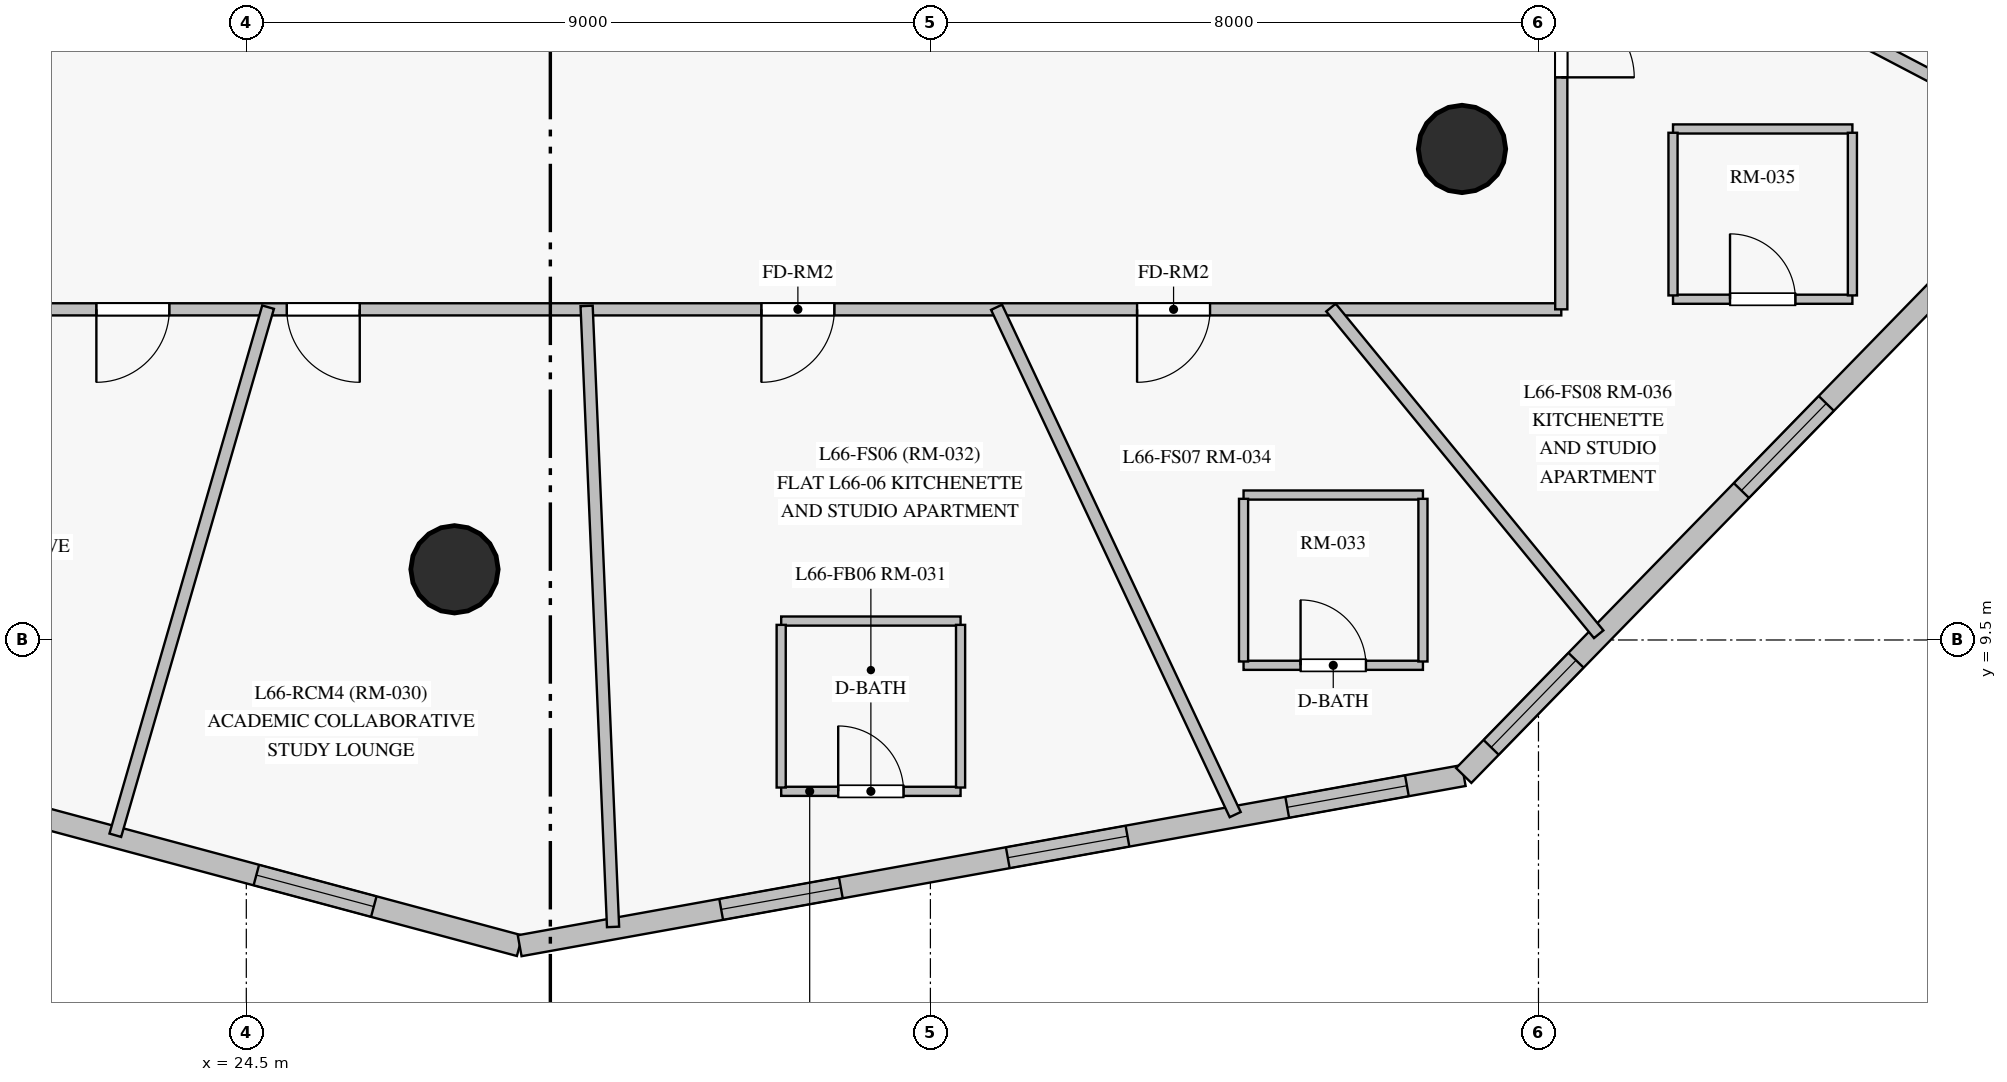
"""IFC4 building model, lengths in metres.
Left out: names, types, materials, properties, quantities, classifications, styles, units other than length and angle.
Written with IfcOpenShell. Run it as: python <this file> out.ifc"""

import sys

from ifc_helpers import new_model, si_unit, direction, frame, frame_2d, origin, origin_with_axes, origin_2d, place, context, subcontext, project, spatial, rectangle, circle, extrude, source, transform, mapped, element, fill, save


model = new_model("IFC4")
c1 = context("Model", 3, precision=1e-05, world=origin(), true_north=direction((0.0, 1.0)))
c2 = subcontext(c1, "Body", "Model", "MODEL_VIEW")
j1 = project(units=[si_unit("LENGTHUNIT", "METRE"), si_unit("PLANEANGLEUNIT", "RADIAN")], contexts=[c1])
p1 = place(None, origin())
s1 = spatial("IfcSite", under=j1, at=p1, CompositionType="ELEMENT")
p2 = place(p1, origin())
s2 = spatial("IfcBuilding", under=s1, at=p2, CompositionType="ELEMENT")
p3 = place(p2, frame((0.0, 0.0, 226.05)))
s3 = spatial("IfcBuildingStorey", under=s2, at=p3, CompositionType="ELEMENT", Elevation=226.05)
m1 = source(origin_with_axes(), c2, "Body", "SweptSolid", [
    extrude(circle(Radius=0.575, at=origin_2d()), origin(), (0.0, 0.0, 1.0), 3.05),
])
for number, where, z_axis, x_axis in (
    (1, (27.239, 10.43, 0.0), (0.0, 0.0, 1.0), (1.0, 0.0, 0.0)),
    (2, (40.494, 15.96, 0.0), (0.0, 0.0, 1.0), (1.0, 0.0, 0.0)),
):
    element("IfcColumn", number, at=place(p3, frame(where, z_axis=z_axis, x_axis=x_axis)), inside=s3, PredefinedType="COLUMN", context=c2, shape_type="MappedRepresentation", body=[
        mapped(m1, transform((0.0, 0.0, 0.0), scale=1.0)),
    ])
p4 = place(p3, frame((18.847, 7.96, 0.0), z_axis=(0.0, 0.0, 1.0), x_axis=(0.965828362132, -0.259182512722, 0.0)))
e3 = element("IfcWall", 3, at=p4, inside=s3, PredefinedType="SOLIDWALL", context=c2, shape_type="SweptSolid", body=[
    extrude(rectangle(XDim=9.576, YDim=0.28, at=frame_2d((4.788, 0.0))), origin(), (0.0, 0.0, 1.0), 2.85),
])
p5 = place(p4, frame((1.261, 0.0, 0.85)))
e4 = element("IfcOpeningElement", 4, at=p5, cuts=e3, PredefinedType="OPENING", context=c2, shape_type="SweptSolid", body=[
    extrude(rectangle(XDim=1.6, YDim=1.6, at=frame_2d((0.8, 0.8))), frame((0.0, 0.15, 0.0), z_axis=(0.0, -1.0, 0.0), x_axis=(1.0, 0.0, 0.0)), (0.0, 0.0, 1.0), 0.3),
])
p6 = place(p4, frame((5.989, 0.0, 0.85)))
e5 = element("IfcOpeningElement", 5, at=p6, cuts=e3, PredefinedType="OPENING", context=c2, shape_type="SweptSolid", body=[
    extrude(rectangle(XDim=1.6, YDim=1.6, at=frame_2d((0.8, 0.8))), frame((0.0, 0.15, 0.0), z_axis=(0.0, -1.0, 0.0), x_axis=(1.0, 0.0, 0.0)), (0.0, 0.0, 1.0), 0.3),
])
p7 = place(p3, frame((28.096, 5.478, 0.0), z_axis=(0.0, 0.0, 1.0), x_axis=(0.984130395751, 0.177446792472, 0.0)))
e6 = element("IfcWall", 6, at=p7, inside=s3, PredefinedType="SOLIDWALL", context=c2, shape_type="SweptSolid", body=[
    extrude(rectangle(XDim=12.621, YDim=0.28, at=frame_2d((6.31, 0.0))), origin(), (0.0, 0.0, 1.0), 2.85),
])
p8 = place(p7, frame((2.694, 0.0, 0.85)))
e7 = element("IfcOpeningElement", 7, at=p8, cuts=e6, PredefinedType="OPENING", context=c2, shape_type="SweptSolid", body=[
    extrude(rectangle(XDim=1.6, YDim=1.6, at=frame_2d((0.8, 0.8))), frame((0.0, 0.15, 0.0), z_axis=(0.0, -1.0, 0.0), x_axis=(1.0, 0.0, 0.0)), (0.0, 0.0, 1.0), 0.3),
])
p9 = place(p7, frame((6.525, 0.0, 0.85)))
e8 = element("IfcOpeningElement", 8, at=p9, cuts=e6, PredefinedType="OPENING", context=c2, shape_type="SweptSolid", body=[
    extrude(rectangle(XDim=1.6, YDim=1.6, at=frame_2d((0.8, 0.8))), frame((0.0, 0.15, 0.0), z_axis=(0.0, -1.0, 0.0), x_axis=(1.0, 0.0, 0.0)), (0.0, 0.0, 1.0), 0.3),
])
p10 = place(p7, frame((10.261, 0.0, 0.85)))
e9 = element("IfcOpeningElement", 9, at=p10, cuts=e6, PredefinedType="OPENING", context=c2, shape_type="SweptSolid", body=[
    extrude(rectangle(XDim=1.6, YDim=1.6, at=frame_2d((0.8, 0.8))), frame((0.0, 0.15, 0.0), z_axis=(0.0, -1.0, 0.0), x_axis=(1.0, 0.0, 0.0)), (0.0, 0.0, 1.0), 0.3),
])
p11 = place(p3, frame((40.517, 7.717, 0.0), z_axis=(0.0, 0.0, 1.0), x_axis=(0.69791379091, 0.716181778921, 0.0)))
e10 = element("IfcWall", 10, at=p11, inside=s3, PredefinedType="SOLIDWALL", context=c2, shape_type="SweptSolid", body=[
    extrude(rectangle(XDim=9.556, YDim=0.28, at=frame_2d((4.778, 0.0))), origin(), (0.0, 0.0, 1.0), 2.85),
])
p12 = place(p11, frame((0.517, 0.0, 0.85)))
e11 = element("IfcOpeningElement", 11, at=p12, cuts=e10, PredefinedType="OPENING", context=c2, shape_type="SweptSolid", body=[
    extrude(rectangle(XDim=1.6, YDim=1.6, at=frame_2d((0.8, 0.8))), frame((0.0, 0.15, 0.0), z_axis=(0.0, -1.0, 0.0), x_axis=(1.0, 0.0, 0.0)), (0.0, 0.0, 1.0), 0.3),
])
p13 = place(p11, frame((5.235, 0.0, 0.85)))
e12 = element("IfcOpeningElement", 12, at=p13, cuts=e10, PredefinedType="OPENING", context=c2, shape_type="SweptSolid", body=[
    extrude(rectangle(XDim=1.6, YDim=1.6, at=frame_2d((0.8, 0.8))), frame((0.0, 0.15, 0.0), z_axis=(0.0, -1.0, 0.0), x_axis=(1.0, 0.0, 0.0)), (0.0, 0.0, 1.0), 0.3),
])
p14 = place(p3, frame((41.8, 13.85, 0.0), z_axis=(0.0, 0.0, 1.0), x_axis=(-1.0, 0.0, 0.0)))
e13 = element("IfcWall", 13, at=p14, inside=s3, PredefinedType="PARTITIONING", context=c2, shape_type="SweptSolid", body=[
    extrude(rectangle(XDim=25.05, YDim=0.16, at=frame_2d((12.525, 0.0))), origin(), (0.0, 0.0, 1.0), 2.3),
])
p15 = place(p14, frame((9.563, 0.0, 0.0)))
e14 = element("IfcOpeningElement", 14, at=p15, cuts=e13, PredefinedType="OPENING", context=c2, shape_type="SweptSolid", body=[
    extrude(rectangle(XDim=0.96, YDim=2.15, at=frame_2d((0.48, 1.075))), frame((0.0, 0.09, 0.0), z_axis=(0.0, -1.0, 0.0), x_axis=(1.0, 0.0, 0.0)), (0.0, 0.0, 1.0), 0.18),
])
p16 = place(p14, frame((4.621, 0.0, 0.0)))
e15 = element("IfcOpeningElement", 15, at=p16, cuts=e13, PredefinedType="OPENING", context=c2, shape_type="SweptSolid", body=[
    extrude(rectangle(XDim=0.96, YDim=2.15, at=frame_2d((0.48, 1.075))), frame((0.0, 0.09, 0.0), z_axis=(0.0, -1.0, 0.0), x_axis=(1.0, 0.0, 0.0)), (0.0, 0.0, 1.0), 0.18),
])
p17 = place(p14, frame((18.312, 0.0, 0.0)))
e16 = element("IfcOpeningElement", 16, at=p17, cuts=e13, PredefinedType="OPENING", context=c2, shape_type="SweptSolid", body=[
    extrude(rectangle(XDim=0.96, YDim=2.15, at=frame_2d((0.48, 1.075))), frame((0.0, 0.09, 0.0), z_axis=(0.0, -1.0, 0.0), x_axis=(1.0, 0.0, 0.0)), (0.0, 0.0, 1.0), 0.18),
])
p18 = place(p14, frame((15.808, 0.0, 0.0)))
e17 = element("IfcOpeningElement", 17, at=p18, cuts=e13, PredefinedType="OPENING", context=c2, shape_type="SweptSolid", body=[
    extrude(rectangle(XDim=0.96, YDim=2.15, at=frame_2d((0.48, 1.075))), frame((0.0, 0.09, 0.0), z_axis=(0.0, -1.0, 0.0), x_axis=(1.0, 0.0, 0.0)), (0.0, 0.0, 1.0), 0.18),
])
p19 = place(p3, frame((41.8, 33.45, 0.0), z_axis=(0.0, 0.0, 1.0), x_axis=(0.0, -1.0, 0.0)))
e18 = element("IfcWall", 18, at=p19, inside=s3, PredefinedType="PARTITIONING", context=c2, shape_type="SweptSolid", body=[
    extrude(rectangle(XDim=19.6, YDim=0.16, at=frame_2d((9.8, 0.0))), origin(), (0.0, 0.0, 1.0), 2.3),
])
p20 = place(p19, frame((15.588, 0.0, 0.0)))
e19 = element("IfcOpeningElement", 19, at=p20, cuts=e18, PredefinedType="OPENING", context=c2, shape_type="SweptSolid", body=[
    extrude(rectangle(XDim=0.96, YDim=2.15, at=frame_2d((0.48, 1.075))), frame((0.0, 0.09, 0.0), z_axis=(0.0, -1.0, 0.0), x_axis=(1.0, 0.0, 0.0)), (0.0, 0.0, 1.0), 0.18),
])
p21 = place(p19, frame((9.365, 0.0, 0.0)))
e20 = element("IfcOpeningElement", 20, at=p21, cuts=e18, PredefinedType="OPENING", context=c2, shape_type="SweptSolid", body=[
    extrude(rectangle(XDim=0.96, YDim=2.15, at=frame_2d((0.48, 1.075))), frame((0.0, 0.09, 0.0), z_axis=(0.0, -1.0, 0.0), x_axis=(1.0, 0.0, 0.0)), (0.0, 0.0, 1.0), 0.18),
])
p22 = place(p19, frame((6.385, 0.0, 0.0)))
e21 = element("IfcOpeningElement", 21, at=p22, cuts=e18, PredefinedType="OPENING", context=c2, shape_type="SweptSolid", body=[
    extrude(rectangle(XDim=0.96, YDim=2.15, at=frame_2d((0.48, 1.075))), frame((0.0, 0.09, 0.0), z_axis=(0.0, -1.0, 0.0), x_axis=(1.0, 0.0, 0.0)), (0.0, 0.0, 1.0), 0.18),
])
p23 = place(p3, frame((28.977, 13.895, 0.0), z_axis=(0.0, 0.0, 1.0), x_axis=(0.042574320149, -0.999093302582, 0.0)))
e22 = element("IfcWall", 22, at=p23, inside=s3, PredefinedType="PARTITIONING", context=c2, shape_type="SweptSolid", body=[
    extrude(rectangle(XDim=8.177, YDim=0.16, at=frame_2d((4.089, 0.0))), origin(), (0.0, 0.0, 1.0), 2.85),
])
p24 = place(p3, frame((34.371, 13.877, 0.0), z_axis=(0.0, 0.0, 1.0), x_axis=(0.425623280848, -0.90490044911, 0.0)))
e23 = element("IfcWall", 23, at=p24, inside=s3, PredefinedType="PARTITIONING", context=c2, shape_type="SweptSolid", body=[
    extrude(rectangle(XDim=7.376, YDim=0.16, at=frame_2d((3.688, 0.0))), origin(), (0.0, 0.0, 1.0), 2.85),
])
p25 = place(p3, frame((24.787, 13.879, 0.0), z_axis=(0.0, 0.0, 1.0), x_axis=(-0.277907263558, -0.960607907974, 0.0)))
e24 = element("IfcWall", 24, at=p25, inside=s3, PredefinedType="PARTITIONING", context=c2, shape_type="SweptSolid", body=[
    extrude(rectangle(XDim=7.233, YDim=0.16, at=frame_2d((3.616, 0.0))), origin(), (0.0, 0.0, 1.0), 2.85),
])
p26 = place(p3, frame((41.773, 19.48, 0.0), z_axis=(0.0, 0.0, 1.0), x_axis=(0.885850546282, -0.463970699131, 0.0)))
e25 = element("IfcWall", 25, at=p26, inside=s3, PredefinedType="PARTITIONING", context=c2, shape_type="SweptSolid", body=[
    extrude(rectangle(XDim=6.032, YDim=0.16, at=frame_2d((3.016, 0.0))), origin(), (0.0, 0.0, 1.0), 2.35),
])
p27 = place(p3, frame((38.77, 13.873, 0.0), z_axis=(0.0, 0.0, 1.0), x_axis=(0.633835753928, -0.773467670328, 0.0)))
e26 = element("IfcWall", 26, at=p27, inside=s3, PredefinedType="PARTITIONING", context=c2, shape_type="SweptSolid", body=[
    extrude(rectangle(XDim=5.557, YDim=0.16, at=frame_2d((2.778, 0.0))), origin(), (0.0, 0.0, 1.0), 2.85),
])
p28 = place(p3, frame((31.537, 7.509, 0.0), z_axis=(0.0, 0.0, 1.0), x_axis=(1.0, 0.0, 0.0)))
e27 = element("IfcWall", 27, at=p28, inside=s3, PredefinedType="PARTITIONING", context=c2, shape_type="SweptSolid", body=[
    extrude(rectangle(XDim=2.36, YDim=0.12, at=frame_2d((1.18, 0.0))), origin(), (0.0, 0.0, 1.0), 2.85),
])
p29 = place(p28, frame((0.75, 0.0, 0.0)))
e28 = element("IfcOpeningElement", 28, at=p29, cuts=e27, PredefinedType="OPENING", context=c2, shape_type="SweptSolid", body=[
    extrude(rectangle(XDim=0.86, YDim=2.1, at=frame_2d((0.43, 1.05))), frame((0.0, 0.07, 0.0), z_axis=(0.0, -1.0, 0.0), x_axis=(1.0, 0.0, 0.0)), (0.0, 0.0, 1.0), 0.14),
])
p30 = place(p3, frame((33.897, 9.749, 0.0), z_axis=(0.0, 0.0, 1.0), x_axis=(-1.0, 0.0, 0.0)))
e29 = element("IfcWall", 29, at=p30, inside=s3, PredefinedType="PARTITIONING", context=c2, shape_type="SweptSolid", body=[
    extrude(rectangle(XDim=2.36, YDim=0.12, at=frame_2d((1.18, 0.0))), origin(), (0.0, 0.0, 1.0), 2.85),
])
p31 = place(p3, frame((37.62, 9.167, 0.0), z_axis=(0.0, 0.0, 1.0), x_axis=(1.0, 0.0, 0.0)))
e30 = element("IfcWall", 30, at=p31, inside=s3, PredefinedType="PARTITIONING", context=c2, shape_type="SweptSolid", body=[
    extrude(rectangle(XDim=2.36, YDim=0.12, at=frame_2d((1.18, 0.0))), origin(), (0.0, 0.0, 1.0), 2.85),
])
p32 = place(p31, frame((0.75, 0.0, 0.0)))
e31 = element("IfcOpeningElement", 31, at=p32, cuts=e30, PredefinedType="OPENING", context=c2, shape_type="SweptSolid", body=[
    extrude(rectangle(XDim=0.86, YDim=2.1, at=frame_2d((0.43, 1.05))), frame((0.0, 0.07, 0.0), z_axis=(0.0, -1.0, 0.0), x_axis=(1.0, 0.0, 0.0)), (0.0, 0.0, 1.0), 0.14),
])
p33 = place(p3, frame((39.98, 11.407, 0.0), z_axis=(0.0, 0.0, 1.0), x_axis=(-1.0, 0.0, 0.0)))
e32 = element("IfcWall", 32, at=p33, inside=s3, PredefinedType="PARTITIONING", context=c2, shape_type="SweptSolid", body=[
    extrude(rectangle(XDim=2.36, YDim=0.12, at=frame_2d((1.18, 0.0))), origin(), (0.0, 0.0, 1.0), 2.85),
])
p34 = place(p3, frame((43.27, 13.983, 0.0), z_axis=(0.0, 0.0, 1.0), x_axis=(1.0, 0.0, 0.0)))
e33 = element("IfcWall", 33, at=p34, inside=s3, PredefinedType="PARTITIONING", context=c2, shape_type="SweptSolid", body=[
    extrude(rectangle(XDim=2.36, YDim=0.12, at=frame_2d((1.18, 0.0))), origin(), (0.0, 0.0, 1.0), 2.85),
])
p35 = place(p34, frame((0.75, 0.0, 0.0)))
e34 = element("IfcOpeningElement", 34, at=p35, cuts=e33, PredefinedType="OPENING", context=c2, shape_type="SweptSolid", body=[
    extrude(rectangle(XDim=0.86, YDim=2.1, at=frame_2d((0.43, 1.05))), frame((0.0, 0.07, 0.0), z_axis=(0.0, -1.0, 0.0), x_axis=(1.0, 0.0, 0.0)), (0.0, 0.0, 1.0), 0.14),
])
p36 = place(p3, frame((45.63, 16.223, 0.0), z_axis=(0.0, 0.0, 1.0), x_axis=(-1.0, 0.0, 0.0)))
e35 = element("IfcWall", 35, at=p36, inside=s3, PredefinedType="PARTITIONING", context=c2, shape_type="SweptSolid", body=[
    extrude(rectangle(XDim=2.36, YDim=0.12, at=frame_2d((1.18, 0.0))), origin(), (0.0, 0.0, 1.0), 2.85),
])
for number, where, z_axis, x_axis in (
    (36, (33.897, 7.559, 0.0), (0.0, 0.0, 1.0), (0.0, 1.0, 0.0)),
    (37, (31.537, 9.699, 0.0), (0.0, 0.0, 1.0), (0.0, -1.0, 0.0)),
    (38, (39.98, 9.217, 0.0), (0.0, 0.0, 1.0), (0.0, 1.0, 0.0)),
    (39, (37.62, 11.357, 0.0), (0.0, 0.0, 1.0), (0.0, -1.0, 0.0)),
):
    element("IfcWall", number, at=place(p3, frame(where, z_axis=z_axis, x_axis=x_axis)), inside=s3, PredefinedType="PARTITIONING", context=c2, shape_type="SweptSolid", body=[
        extrude(rectangle(XDim=2.14, YDim=0.12, at=frame_2d((1.07, 0.0))), origin(), (0.0, 0.0, 1.0), 2.85),
    ])
for number, where, z_axis, x_axis in (
    (40, (45.63, 14.033, 0.0), (0.0, 0.0, 1.0), (0.0, 1.0, 0.0)),
    (41, (43.27, 16.173, 0.0), (0.0, 0.0, 1.0), (0.0, -1.0, 0.0)),
):
    element("IfcWall", number, at=place(p3, frame(where, z_axis=z_axis, x_axis=x_axis)), inside=s3, PredefinedType="PARTITIONING", context=c2, shape_type="SweptSolid", body=[
        extrude(rectangle(XDim=2.14, YDim=0.12, at=frame_2d((1.07, 0.0))), origin(), (0.0, 0.0, 1.0), 2.85),
    ])
m2 = source(origin_with_axes(), c2, "Body", "SweptSolid", [
    extrude(rectangle(XDim=1.6, YDim=1.6, at=frame_2d((0.8, 0.8))), frame((0.0, 0.03, 0.0), z_axis=(0.0, -1.0, 0.0), x_axis=(1.0, 0.0, 0.0)), (0.0, 0.0, 1.0), 0.06),
])
p37 = place(p6, origin())
e42 = element("IfcWindow", 42, at=p37, inside=s3, PartitioningType="SINGLE_PANEL", PredefinedType="WINDOW", context=c2, shape_type="MappedRepresentation", body=[
    mapped(m2, transform((0.0, 0.0, 0.0), scale=1.0)),
])
fill(e5, e42)
p38 = place(p8, origin())
e43 = element("IfcWindow", 43, at=p38, inside=s3, PartitioningType="SINGLE_PANEL", PredefinedType="WINDOW", context=c2, shape_type="MappedRepresentation", body=[
    mapped(m2, transform((0.0, 0.0, 0.0), scale=1.0)),
])
fill(e7, e43)
p39 = place(p9, origin())
e44 = element("IfcWindow", 44, at=p39, inside=s3, PartitioningType="SINGLE_PANEL", PredefinedType="WINDOW", context=c2, shape_type="MappedRepresentation", body=[
    mapped(m2, transform((0.0, 0.0, 0.0), scale=1.0)),
])
fill(e8, e44)
p40 = place(p10, origin())
e45 = element("IfcWindow", 45, at=p40, inside=s3, PartitioningType="SINGLE_PANEL", PredefinedType="WINDOW", context=c2, shape_type="MappedRepresentation", body=[
    mapped(m2, transform((0.0, 0.0, 0.0), scale=1.0)),
])
fill(e9, e45)
p41 = place(p12, origin())
e46 = element("IfcWindow", 46, at=p41, inside=s3, PartitioningType="SINGLE_PANEL", PredefinedType="WINDOW", context=c2, shape_type="MappedRepresentation", body=[
    mapped(m2, transform((0.0, 0.0, 0.0), scale=1.0)),
])
fill(e11, e46)
p42 = place(p13, origin())
e47 = element("IfcWindow", 47, at=p42, inside=s3, PartitioningType="SINGLE_PANEL", PredefinedType="WINDOW", context=c2, shape_type="MappedRepresentation", body=[
    mapped(m2, transform((0.0, 0.0, 0.0), scale=1.0)),
])
fill(e12, e47)
m3 = source(origin_with_axes(), c2, "Body", "SweptSolid", [
    extrude(rectangle(XDim=0.86, YDim=2.1, at=frame_2d((0.43, 1.05))), frame((0.0, 0.025, 0.0), z_axis=(0.0, -1.0, 0.0), x_axis=(1.0, 0.0, 0.0)), (0.0, 0.0, 1.0), 0.05),
])
p43 = place(p29, origin())
e48 = element("IfcDoor", 48, at=p43, inside=s3, OperationType="SINGLE_SWING_LEFT", PredefinedType="DOOR", context=c2, shape_type="MappedRepresentation", body=[
    mapped(m3, transform((0.0, 0.0, 0.0), scale=1.0)),
])
fill(e28, e48)
m4 = source(origin_with_axes(), c2, "Body", "SweptSolid", [
    extrude(rectangle(XDim=0.96, YDim=2.15, at=frame_2d((0.48, 1.075))), frame((0.0, 0.025, 0.0), z_axis=(0.0, -1.0, 0.0), x_axis=(1.0, 0.0, 0.0)), (0.0, 0.0, 1.0), 0.05),
])
p44 = place(p15, origin())
e49 = element("IfcDoor", 49, at=p44, inside=s3, OperationType="SINGLE_SWING_RIGHT", PredefinedType="DOOR", context=c2, shape_type="MappedRepresentation", body=[
    mapped(m4, transform((0.0, 0.0, 0.0), scale=1.0)),
])
fill(e14, e49)
p45 = place(p32, origin())
e50 = element("IfcDoor", 50, at=p45, inside=s3, OperationType="SINGLE_SWING_LEFT", PredefinedType="DOOR", context=c2, shape_type="MappedRepresentation", body=[
    mapped(m3, transform((0.0, 0.0, 0.0), scale=1.0)),
])
fill(e31, e50)
p46 = place(p16, origin())
e51 = element("IfcDoor", 51, at=p46, inside=s3, OperationType="SINGLE_SWING_RIGHT", PredefinedType="DOOR", context=c2, shape_type="MappedRepresentation", body=[
    mapped(m4, transform((0.0, 0.0, 0.0), scale=1.0)),
])
fill(e15, e51)
p47 = place(p35, origin())
e52 = element("IfcDoor", 52, at=p47, inside=s3, OperationType="SINGLE_SWING_LEFT", PredefinedType="DOOR", context=c2, shape_type="MappedRepresentation", body=[
    mapped(m3, transform((0.0, 0.0, 0.0), scale=1.0)),
])
fill(e34, e52)
p48 = place(p20, origin())
e53 = element("IfcDoor", 53, at=p48, inside=s3, OperationType="SINGLE_SWING_RIGHT", PredefinedType="DOOR", context=c2, shape_type="MappedRepresentation", body=[
    mapped(m4, transform((0.0, 0.0, 0.0), scale=1.0)),
])
fill(e19, e53)
p49 = place(p17, origin())
e54 = element("IfcDoor", 54, at=p49, inside=s3, OperationType="SINGLE_SWING_RIGHT", PredefinedType="DOOR", context=c2, shape_type="MappedRepresentation", body=[
    mapped(m4, transform((0.0, 0.0, 0.0), scale=1.0)),
])
fill(e16, e54)
p50 = place(p18, origin())
e55 = element("IfcDoor", 55, at=p50, inside=s3, OperationType="SINGLE_SWING_LEFT", PredefinedType="DOOR", context=c2, shape_type="MappedRepresentation", body=[
    mapped(m4, transform((0.0, 0.0, 0.0), scale=1.0)),
])
fill(e17, e55)
save(model, sys.argv[1])
